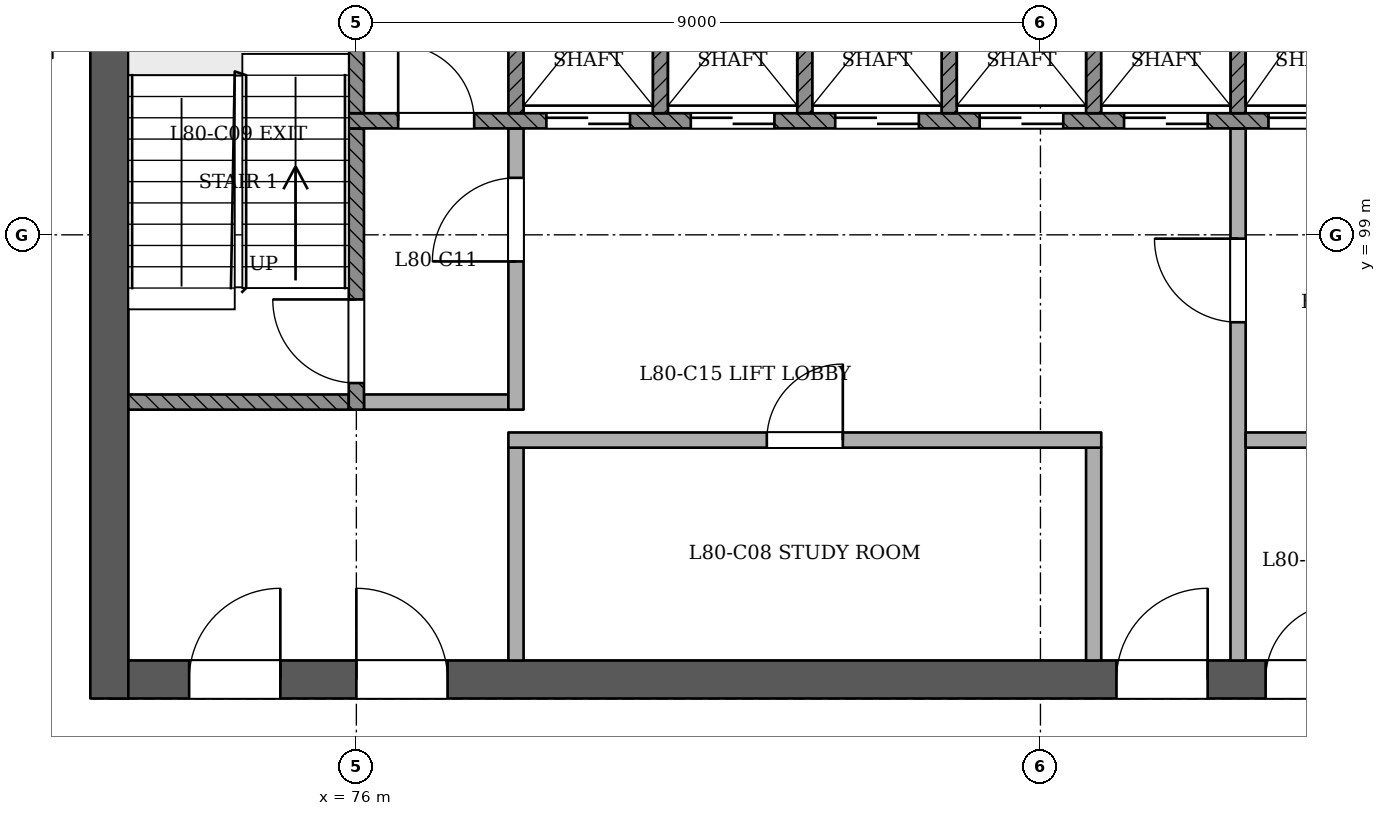
"""IFC4 building model, lengths in metres.
Left out: names, types, materials, properties, quantities, classifications, styles, units other than length and angle.
Written with IfcOpenShell. Run it as: python <this file> out.ifc"""

import sys

from ifc_helpers import new_model, si_unit, direction, frame, frame_2d, origin, place, context, subcontext, project, spatial, rectangle, extrude, element, fill, save


model = new_model("IFC4")
c1 = context("Model", 3, precision=1e-05, world=origin(), true_north=direction((0.0, 1.0)))
c2 = subcontext(c1, "Body", "Model", "MODEL_VIEW")
j1 = project(units=[si_unit("LENGTHUNIT", "METRE"), si_unit("PLANEANGLEUNIT", "RADIAN")], contexts=[c1])
p1 = place(None, origin())
s1 = spatial("IfcSite", under=j1, at=p1, CompositionType="ELEMENT")
p2 = place(p1, origin())
s2 = spatial("IfcBuilding", under=s1, at=p2, CompositionType="ELEMENT")
p3 = place(p2, frame((0.0, 0.0, 309.4)))
s3 = spatial("IfcBuildingStorey", under=s2, at=p3, CompositionType="ELEMENT", Elevation=309.4)
p4 = place(p3, frame((72.75, 93.15, 0.0), z_axis=(0.0, 0.0, 1.0), x_axis=(1.0, 0.0, 0.0)))
e1 = element("IfcWall", 1, at=p4, inside=s3, PredefinedType="SHEAR", context=c2, shape_type="SweptSolid", body=[
    extrude(rectangle(XDim=24.75, YDim=0.5, at=frame_2d((12.375, 0.0))), origin(), (0.0, 0.0, 1.0), 3.6),
])
p5 = place(p4, frame((1.05, 0.0, 0.0)))
e2 = element("IfcOpeningElement", 2, at=p5, cuts=e1, PredefinedType="OPENING", context=c2, shape_type="SweptSolid", body=[
    extrude(rectangle(XDim=1.2, YDim=2.1, at=frame_2d((0.6, 1.05))), frame((0.0, 0.26, 0.0), z_axis=(0.0, -1.0, 0.0), x_axis=(1.0, 0.0, 0.0)), (0.0, 0.0, 1.0), 0.521),
])
p6 = place(p4, frame((3.25, 0.0, 0.0)))
e3 = element("IfcOpeningElement", 3, at=p6, cuts=e1, PredefinedType="OPENING", context=c2, shape_type="SweptSolid", body=[
    extrude(rectangle(XDim=1.2, YDim=2.1, at=frame_2d((0.6, 1.05))), frame((0.0, 0.26, 0.0), z_axis=(0.0, -1.0, 0.0), x_axis=(1.0, 0.0, 0.0)), (0.0, 0.0, 1.0), 0.521),
])
p7 = place(p4, frame((13.25, 0.0, 0.0)))
e4 = element("IfcOpeningElement", 4, at=p7, cuts=e1, PredefinedType="OPENING", context=c2, shape_type="SweptSolid", body=[
    extrude(rectangle(XDim=1.2, YDim=2.1, at=frame_2d((0.6, 1.05))), frame((0.0, 0.26, 0.0), z_axis=(0.0, -1.0, 0.0), x_axis=(1.0, 0.0, 0.0)), (0.0, 0.0, 1.0), 0.521),
])
p8 = place(p4, frame((15.212, 0.0, 0.0)))
e5 = element("IfcOpeningElement", 5, at=p8, cuts=e1, PredefinedType="OPENING", context=c2, shape_type="SweptSolid", body=[
    extrude(rectangle(XDim=1.0, YDim=2.1, at=frame_2d((0.5, 1.05))), frame((0.0, 0.26, 0.0), z_axis=(0.0, -1.0, 0.0), x_axis=(1.0, 0.0, 0.0)), (0.0, 0.0, 1.0), 0.521),
])
p9 = place(p4, frame((18.05, 0.0, 0.0)))
e6 = element("IfcOpeningElement", 6, at=p9, cuts=e1, PredefinedType="OPENING", context=c2, shape_type="SweptSolid", body=[
    extrude(rectangle(XDim=1.0, YDim=2.1, at=frame_2d((0.5, 1.05))), frame((0.0, 0.26, 0.0), z_axis=(0.0, -1.0, 0.0), x_axis=(1.0, 0.0, 0.0)), (0.0, 0.0, 1.0), 0.521),
])
p10 = place(p4, frame((20.95, 0.0, 0.0)))
e7 = element("IfcOpeningElement", 7, at=p10, cuts=e1, PredefinedType="OPENING", context=c2, shape_type="SweptSolid", body=[
    extrude(rectangle(XDim=1.0, YDim=2.1, at=frame_2d((0.5, 1.05))), frame((0.0, 0.26, 0.0), z_axis=(0.0, -1.0, 0.0), x_axis=(1.0, 0.0, 0.0)), (0.0, 0.0, 1.0), 0.521),
])
p11 = place(p4, frame((22.837, 0.0, 0.0)))
e8 = element("IfcOpeningElement", 8, at=p11, cuts=e1, PredefinedType="OPENING", context=c2, shape_type="SweptSolid", body=[
    extrude(rectangle(XDim=1.0, YDim=2.1, at=frame_2d((0.5, 1.05))), frame((0.0, 0.26, 0.0), z_axis=(0.0, -1.0, 0.0), x_axis=(1.0, 0.0, 0.0)), (0.0, 0.0, 1.0), 0.521),
])
p12 = place(p3, frame((72.75, 103.65, 0.0), z_axis=(0.0, 0.0, 1.0), x_axis=(0.0, -1.0, 0.0)))
e9 = element("IfcWall", 9, at=p12, inside=s3, PredefinedType="SHEAR", context=c2, shape_type="SweptSolid", body=[
    extrude(rectangle(XDim=10.75, YDim=0.5, at=frame_2d((5.375, 0.0))), origin(), (0.0, 0.0, 1.0), 3.6),
])
for number, where, z_axis, x_axis in (
    (10, (78.1, 93.4, 0.0), (0.0, 0.0, 1.0), (0.0, 1.0, 0.0)),
    (11, (85.7, 93.4, 0.0), (0.0, 0.0, 1.0), (0.0, 1.0, 0.0)),
):
    element("IfcWall", number, at=place(p3, frame(where, z_axis=z_axis, x_axis=x_axis)), inside=s3, PredefinedType="PARTITIONING", context=c2, shape_type="SweptSolid", body=[
        extrude(rectangle(XDim=2.8, YDim=0.2, at=frame_2d((1.4, 0.0))), origin(), (0.0, 0.0, 1.0), 3.2),
    ])
p13 = place(p3, frame((87.6, 93.4, 0.0), z_axis=(0.0, 0.0, 1.0), x_axis=(0.0, 1.0, 0.0)))
e12 = element("IfcWall", 12, at=p13, inside=s3, PredefinedType="PARTITIONING", context=c2, shape_type="SweptSolid", body=[
    extrude(rectangle(XDim=7.0, YDim=0.2, at=frame_2d((3.5, 0.0))), origin(), (0.0, 0.0, 1.0), 3.2),
])
p14 = place(p13, frame((4.45, 0.0, 0.0)))
e13 = element("IfcOpeningElement", 13, at=p14, cuts=e12, PredefinedType="OPENING", context=c2, shape_type="SweptSolid", body=[
    extrude(rectangle(XDim=1.1, YDim=2.1, at=frame_2d((0.55, 1.05))), frame((0.0, 0.11, 0.0), z_axis=(0.0, -1.0, 0.0), x_axis=(1.0, 0.0, 0.0)), (0.0, 0.0, 1.0), 0.221),
])
p15 = place(p3, frame((78.0, 96.3, 0.0), z_axis=(0.0, 0.0, 1.0), x_axis=(1.0, 0.0, 0.0)))
e14 = element("IfcWall", 14, at=p15, inside=s3, PredefinedType="PARTITIONING", context=c2, shape_type="SweptSolid", body=[
    extrude(rectangle(XDim=7.8, YDim=0.2, at=frame_2d((3.9, 0.0))), origin(), (0.0, 0.0, 1.0), 3.2),
])
p16 = place(p15, frame((3.4, 0.0, 0.0)))
e15 = element("IfcOpeningElement", 15, at=p16, cuts=e14, PredefinedType="OPENING", context=c2, shape_type="SweptSolid", body=[
    extrude(rectangle(XDim=1.0, YDim=2.1, at=frame_2d((0.5, 1.05))), frame((0.0, 0.11, 0.0), z_axis=(0.0, -1.0, 0.0), x_axis=(1.0, 0.0, 0.0)), (0.0, 0.0, 1.0), 0.221),
])
p17 = place(p3, frame((87.7, 96.3, 0.0), z_axis=(0.0, 0.0, 1.0), x_axis=(1.0, 0.0, 0.0)))
e16 = element("IfcWall", 16, at=p17, inside=s3, PredefinedType="PARTITIONING", context=c2, shape_type="SweptSolid", body=[
    extrude(rectangle(XDim=3.6, YDim=0.2, at=frame_2d((1.8, 0.0))), origin(), (0.0, 0.0, 1.0), 3.2),
])
p18 = place(p3, frame((73.0, 96.8, 0.0), z_axis=(0.0, 0.0, 1.0), x_axis=(1.0, 0.0, 0.0)))
e17 = element("IfcWall", 17, at=p18, inside=s3, PredefinedType="SOLIDWALL", context=c2, shape_type="SweptSolid", body=[
    extrude(rectangle(XDim=2.9, YDim=0.2, at=frame_2d((1.45, 0.0))), origin(), (0.0, 0.0, 1.0), 3.2),
])
p19 = place(p3, frame((76.0, 96.7, 0.0), z_axis=(0.0, 0.0, 1.0), x_axis=(0.0, 1.0, 0.0)))
e18 = element("IfcWall", 18, at=p19, inside=s3, PredefinedType="SOLIDWALL", context=c2, shape_type="SweptSolid", body=[
    extrude(rectangle(XDim=3.7, YDim=0.2, at=frame_2d((1.85, 0.0))), origin(), (0.0, 0.0, 1.0), 3.2),
])
p20 = place(p19, frame((0.35, 0.0, 0.0)))
e19 = element("IfcOpeningElement", 19, at=p20, cuts=e18, PredefinedType="OPENING", context=c2, shape_type="SweptSolid", body=[
    extrude(rectangle(XDim=1.1, YDim=2.1, at=frame_2d((0.55, 1.05))), frame((0.0, 0.11, 0.0), z_axis=(0.0, -1.0, 0.0), x_axis=(1.0, 0.0, 0.0)), (0.0, 0.0, 1.0), 0.221),
])
p21 = place(p3, frame((76.1, 96.8, 0.0), z_axis=(0.0, 0.0, 1.0), x_axis=(1.0, 0.0, 0.0)))
e20 = element("IfcWall", 20, at=p21, inside=s3, PredefinedType="PARTITIONING", context=c2, shape_type="SweptSolid", body=[
    extrude(rectangle(XDim=1.9, YDim=0.2, at=frame_2d((0.95, 0.0))), origin(), (0.0, 0.0, 1.0), 3.2),
])
p22 = place(p3, frame((78.1, 96.7, 0.0), z_axis=(0.0, 0.0, 1.0), x_axis=(0.0, 1.0, 0.0)))
e21 = element("IfcWall", 21, at=p22, inside=s3, PredefinedType="PARTITIONING", context=c2, shape_type="SweptSolid", body=[
    extrude(rectangle(XDim=3.7, YDim=0.2, at=frame_2d((1.85, 0.0))), origin(), (0.0, 0.0, 1.0), 3.2),
])
p23 = place(p22, frame((1.95, 0.0, 0.0)))
e22 = element("IfcOpeningElement", 22, at=p23, cuts=e21, PredefinedType="OPENING", context=c2, shape_type="SweptSolid", body=[
    extrude(rectangle(XDim=1.1, YDim=2.1, at=frame_2d((0.55, 1.05))), frame((0.0, 0.11, 0.0), z_axis=(0.0, -1.0, 0.0), x_axis=(1.0, 0.0, 0.0)), (0.0, 0.0, 1.0), 0.221),
])
p24 = place(p3, frame((75.9, 100.5, 0.0), z_axis=(0.0, 0.0, 1.0), x_axis=(1.0, 0.0, 0.0)))
e23 = element("IfcWall", 23, at=p24, inside=s3, PredefinedType="SOLIDWALL", context=c2, shape_type="SweptSolid", body=[
    extrude(rectangle(XDim=18.2, YDim=0.2, at=frame_2d((9.1, 0.0))), origin(), (0.0, 0.0, 1.0), 3.2),
])
p25 = place(p24, frame((2.6, 0.0, 0.0)))
e24 = element("IfcOpeningElement", 24, at=p25, cuts=e23, PredefinedType="OPENING", context=c2, shape_type="SweptSolid", body=[
    extrude(rectangle(XDim=1.1, YDim=2.1, at=frame_2d((0.55, 1.05))), frame((0.0, 0.11, 0.0), z_axis=(0.0, -1.0, 0.0), x_axis=(1.0, 0.0, 0.0)), (0.0, 0.0, 1.0), 0.221),
])
p26 = place(p24, frame((4.5, 0.0, 0.0)))
e25 = element("IfcOpeningElement", 25, at=p26, cuts=e23, PredefinedType="OPENING", context=c2, shape_type="SweptSolid", body=[
    extrude(rectangle(XDim=1.1, YDim=2.1, at=frame_2d((0.55, 1.05))), frame((0.0, 0.11, 0.0), z_axis=(0.0, -1.0, 0.0), x_axis=(1.0, 0.0, 0.0)), (0.0, 0.0, 1.0), 0.221),
])
p27 = place(p24, frame((6.4, 0.0, 0.0)))
e26 = element("IfcOpeningElement", 26, at=p27, cuts=e23, PredefinedType="OPENING", context=c2, shape_type="SweptSolid", body=[
    extrude(rectangle(XDim=1.1, YDim=2.1, at=frame_2d((0.55, 1.05))), frame((0.0, 0.11, 0.0), z_axis=(0.0, -1.0, 0.0), x_axis=(1.0, 0.0, 0.0)), (0.0, 0.0, 1.0), 0.221),
])
p28 = place(p24, frame((8.3, 0.0, 0.0)))
e27 = element("IfcOpeningElement", 27, at=p28, cuts=e23, PredefinedType="OPENING", context=c2, shape_type="SweptSolid", body=[
    extrude(rectangle(XDim=1.1, YDim=2.1, at=frame_2d((0.55, 1.05))), frame((0.0, 0.11, 0.0), z_axis=(0.0, -1.0, 0.0), x_axis=(1.0, 0.0, 0.0)), (0.0, 0.0, 1.0), 0.221),
])
p29 = place(p24, frame((10.2, 0.0, 0.0)))
e28 = element("IfcOpeningElement", 28, at=p29, cuts=e23, PredefinedType="OPENING", context=c2, shape_type="SweptSolid", body=[
    extrude(rectangle(XDim=1.1, YDim=2.1, at=frame_2d((0.55, 1.05))), frame((0.0, 0.11, 0.0), z_axis=(0.0, -1.0, 0.0), x_axis=(1.0, 0.0, 0.0)), (0.0, 0.0, 1.0), 0.221),
])
p30 = place(p24, frame((12.1, 0.0, 0.0)))
e29 = element("IfcOpeningElement", 29, at=p30, cuts=e23, PredefinedType="OPENING", context=c2, shape_type="SweptSolid", body=[
    extrude(rectangle(XDim=1.1, YDim=2.1, at=frame_2d((0.55, 1.05))), frame((0.0, 0.11, 0.0), z_axis=(0.0, -1.0, 0.0), x_axis=(1.0, 0.0, 0.0)), (0.0, 0.0, 1.0), 0.221),
])
p31 = place(p24, frame((14.0, 0.0, 0.0)))
e30 = element("IfcOpeningElement", 30, at=p31, cuts=e23, PredefinedType="OPENING", context=c2, shape_type="SweptSolid", body=[
    extrude(rectangle(XDim=1.1, YDim=2.1, at=frame_2d((0.55, 1.05))), frame((0.0, 0.11, 0.0), z_axis=(0.0, -1.0, 0.0), x_axis=(1.0, 0.0, 0.0)), (0.0, 0.0, 1.0), 0.221),
])
p32 = place(p24, frame((0.65, 0.0, 0.0)))
e31 = element("IfcOpeningElement", 31, at=p32, cuts=e23, PredefinedType="OPENING", context=c2, shape_type="SweptSolid", body=[
    extrude(rectangle(XDim=1.0, YDim=2.1, at=frame_2d((0.5, 1.05))), frame((0.0, 0.11, 0.0), z_axis=(0.0, -1.0, 0.0), x_axis=(1.0, 0.0, 0.0)), (0.0, 0.0, 1.0), 0.221),
])
p33 = place(p24, frame((16.3, 0.0, 0.0)))
e32 = element("IfcOpeningElement", 32, at=p33, cuts=e23, PredefinedType="OPENING", context=c2, shape_type="SweptSolid", body=[
    extrude(rectangle(XDim=1.0, YDim=2.1, at=frame_2d((0.5, 1.05))), frame((0.0, 0.11, 0.0), z_axis=(0.0, -1.0, 0.0), x_axis=(1.0, 0.0, 0.0)), (0.0, 0.0, 1.0), 0.221),
])
for number, where, z_axis, x_axis in (
    (33, (76.0, 100.6, 0.0), (0.0, 0.0, 1.0), (0.0, 1.0, 0.0)),
    (34, (78.1, 100.6, 0.0), (0.0, 0.0, 1.0), (0.0, 1.0, 0.0)),
    (35, (80.0, 100.6, 0.0), (0.0, 0.0, 1.0), (0.0, 1.0, 0.0)),
    (36, (81.9, 100.6, 0.0), (0.0, 0.0, 1.0), (0.0, 1.0, 0.0)),
    (37, (83.8, 100.6, 0.0), (0.0, 0.0, 1.0), (0.0, 1.0, 0.0)),
    (38, (85.7, 100.6, 0.0), (0.0, 0.0, 1.0), (0.0, 1.0, 0.0)),
    (39, (87.6, 100.6, 0.0), (0.0, 0.0, 1.0), (0.0, 1.0, 0.0)),
):
    element("IfcWall", number, at=place(p3, frame(where, z_axis=z_axis, x_axis=x_axis)), inside=s3, PredefinedType="SOLIDWALL", context=c2, shape_type="SweptSolid", body=[
        extrude(rectangle(XDim=2.8, YDim=0.2, at=frame_2d((1.4, 0.0))), origin(), (0.0, 0.0, 1.0), 3.2),
    ])
p34 = place(p25, origin())
e40 = element("IfcDoor", 40, at=p34, inside=s3, OperationType="SLIDING_TO_RIGHT", PredefinedType="NOTDEFINED", context=c2, shape_type="SweptSolid", body=[
    extrude(rectangle(XDim=1.1, YDim=2.1, at=frame_2d((0.55, 1.05))), frame((0.0, 0.025, 0.0), z_axis=(0.0, -1.0, 0.0), x_axis=(1.0, 0.0, 0.0)), (0.0, 0.0, 1.0), 0.05),
])
fill(e24, e40)
p35 = place(p26, origin())
e41 = element("IfcDoor", 41, at=p35, inside=s3, OperationType="SLIDING_TO_LEFT", PredefinedType="NOTDEFINED", context=c2, shape_type="SweptSolid", body=[
    extrude(rectangle(XDim=1.1, YDim=2.1, at=frame_2d((0.55, 1.05))), frame((0.0, 0.025, 0.0), z_axis=(0.0, -1.0, 0.0), x_axis=(1.0, 0.0, 0.0)), (0.0, 0.0, 1.0), 0.05),
])
fill(e25, e41)
p36 = place(p27, origin())
e42 = element("IfcDoor", 42, at=p36, inside=s3, OperationType="SLIDING_TO_RIGHT", PredefinedType="NOTDEFINED", context=c2, shape_type="SweptSolid", body=[
    extrude(rectangle(XDim=1.1, YDim=2.1, at=frame_2d((0.55, 1.05))), frame((0.0, 0.025, 0.0), z_axis=(0.0, -1.0, 0.0), x_axis=(1.0, 0.0, 0.0)), (0.0, 0.0, 1.0), 0.05),
])
fill(e26, e42)
p37 = place(p28, origin())
e43 = element("IfcDoor", 43, at=p37, inside=s3, OperationType="SLIDING_TO_LEFT", PredefinedType="NOTDEFINED", context=c2, shape_type="SweptSolid", body=[
    extrude(rectangle(XDim=1.1, YDim=2.1, at=frame_2d((0.55, 1.05))), frame((0.0, 0.025, 0.0), z_axis=(0.0, -1.0, 0.0), x_axis=(1.0, 0.0, 0.0)), (0.0, 0.0, 1.0), 0.05),
])
fill(e27, e43)
p38 = place(p29, origin())
e44 = element("IfcDoor", 44, at=p38, inside=s3, OperationType="SLIDING_TO_RIGHT", PredefinedType="NOTDEFINED", context=c2, shape_type="SweptSolid", body=[
    extrude(rectangle(XDim=1.1, YDim=2.1, at=frame_2d((0.55, 1.05))), frame((0.0, 0.025, 0.0), z_axis=(0.0, -1.0, 0.0), x_axis=(1.0, 0.0, 0.0)), (0.0, 0.0, 1.0), 0.05),
])
fill(e28, e44)
p39 = place(p30, origin())
e45 = element("IfcDoor", 45, at=p39, inside=s3, OperationType="SLIDING_TO_RIGHT", PredefinedType="NOTDEFINED", context=c2, shape_type="SweptSolid", body=[
    extrude(rectangle(XDim=1.1, YDim=2.1, at=frame_2d((0.55, 1.05))), frame((0.0, 0.025, 0.0), z_axis=(0.0, -1.0, 0.0), x_axis=(1.0, 0.0, 0.0)), (0.0, 0.0, 1.0), 0.05),
])
fill(e29, e45)
p40 = place(p20, origin())
e46 = element("IfcDoor", 46, at=p40, inside=s3, OperationType="SINGLE_SWING_RIGHT", PredefinedType="NOTDEFINED", context=c2, shape_type="SweptSolid", body=[
    extrude(rectangle(XDim=1.1, YDim=2.1, at=frame_2d((0.55, 1.05))), frame((0.0, 0.025, 0.0), z_axis=(0.0, -1.0, 0.0), x_axis=(1.0, 0.0, 0.0)), (0.0, 0.0, 1.0), 0.05),
])
fill(e19, e46)
p41 = place(p23, origin())
e47 = element("IfcDoor", 47, at=p41, inside=s3, OperationType="SINGLE_SWING_LEFT", PredefinedType="NOTDEFINED", context=c2, shape_type="SweptSolid", body=[
    extrude(rectangle(XDim=1.1, YDim=2.1, at=frame_2d((0.55, 1.05))), frame((0.0, 0.025, 0.0), z_axis=(0.0, -1.0, 0.0), x_axis=(1.0, 0.0, 0.0)), (0.0, 0.0, 1.0), 0.05),
])
fill(e22, e47)
p42 = place(p14, origin())
e48 = element("IfcDoor", 48, at=p42, inside=s3, OperationType="SINGLE_SWING_RIGHT", PredefinedType="NOTDEFINED", context=c2, shape_type="SweptSolid", body=[
    extrude(rectangle(XDim=1.1, YDim=2.1, at=frame_2d((0.55, 1.05))), frame((0.0, 0.025, 0.0), z_axis=(0.0, -1.0, 0.0), x_axis=(1.0, 0.0, 0.0)), (0.0, 0.0, 1.0), 0.05),
])
fill(e13, e48)
p43 = place(p5, origin())
e49 = element("IfcDoor", 49, at=p43, inside=s3, OperationType="SINGLE_SWING_RIGHT", PredefinedType="NOTDEFINED", context=c2, shape_type="SweptSolid", body=[
    extrude(rectangle(XDim=1.2, YDim=2.1, at=frame_2d((0.6, 1.05))), frame((0.0, 0.025, 0.0), z_axis=(0.0, -1.0, 0.0), x_axis=(1.0, 0.0, 0.0)), (0.0, 0.0, 1.0), 0.05),
])
fill(e2, e49)
p44 = place(p6, origin())
e50 = element("IfcDoor", 50, at=p44, inside=s3, OperationType="SINGLE_SWING_LEFT", PredefinedType="NOTDEFINED", context=c2, shape_type="SweptSolid", body=[
    extrude(rectangle(XDim=1.2, YDim=2.1, at=frame_2d((0.6, 1.05))), frame((0.0, 0.025, 0.0), z_axis=(0.0, -1.0, 0.0), x_axis=(1.0, 0.0, 0.0)), (0.0, 0.0, 1.0), 0.05),
])
fill(e3, e50)
p45 = place(p7, origin())
e51 = element("IfcDoor", 51, at=p45, inside=s3, OperationType="SINGLE_SWING_RIGHT", PredefinedType="NOTDEFINED", context=c2, shape_type="SweptSolid", body=[
    extrude(rectangle(XDim=1.2, YDim=2.1, at=frame_2d((0.6, 1.05))), frame((0.0, 0.025, 0.0), z_axis=(0.0, -1.0, 0.0), x_axis=(1.0, 0.0, 0.0)), (0.0, 0.0, 1.0), 0.05),
])
fill(e4, e51)
p46 = place(p32, origin())
e52 = element("IfcDoor", 52, at=p46, inside=s3, OperationType="SINGLE_SWING_LEFT", PredefinedType="NOTDEFINED", context=c2, shape_type="SweptSolid", body=[
    extrude(rectangle(XDim=1.0, YDim=2.1, at=frame_2d((0.5, 1.05))), frame((0.0, 0.025, 0.0), z_axis=(0.0, -1.0, 0.0), x_axis=(1.0, 0.0, 0.0)), (0.0, 0.0, 1.0), 0.05),
])
fill(e31, e52)
p47 = place(p8, origin())
e53 = element("IfcDoor", 53, at=p47, inside=s3, OperationType="SINGLE_SWING_RIGHT", PredefinedType="NOTDEFINED", context=c2, shape_type="SweptSolid", body=[
    extrude(rectangle(XDim=1.0, YDim=2.1, at=frame_2d((0.5, 1.05))), frame((0.0, 0.025, 0.0), z_axis=(0.0, -1.0, 0.0), x_axis=(1.0, 0.0, 0.0)), (0.0, 0.0, 1.0), 0.05),
])
fill(e5, e53)
p48 = place(p16, origin())
e54 = element("IfcDoor", 54, at=p48, inside=s3, OperationType="SINGLE_SWING_RIGHT", PredefinedType="NOTDEFINED", context=c2, shape_type="SweptSolid", body=[
    extrude(rectangle(XDim=1.0, YDim=2.1, at=frame_2d((0.5, 1.05))), frame((0.0, 0.025, 0.0), z_axis=(0.0, -1.0, 0.0), x_axis=(1.0, 0.0, 0.0)), (0.0, 0.0, 1.0), 0.05),
])
fill(e15, e54)
save(model, sys.argv[1])
